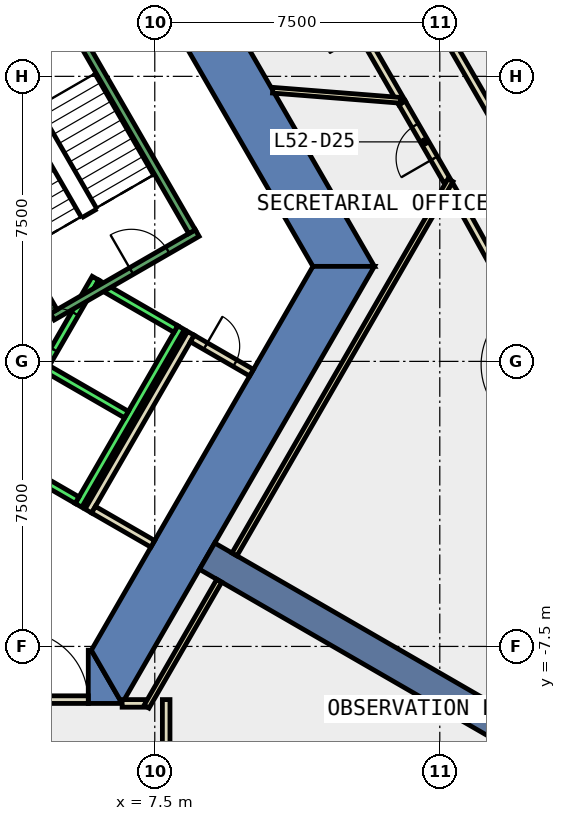
"""IFC4 building model, lengths in metres.
Left out: names, types, materials, properties, quantities, classifications, styles, units other than length and angle.
Written with IfcOpenShell. Run it as: python <this file> out.ifc"""

import sys

from ifc_helpers import new_model, si_unit, direction, frame, frame_2d, origin, place, context, subcontext, project, spatial, polyline, rectangle, outline, extrude, element, fill, save


model = new_model("IFC4")
c1 = context("Model", 3, precision=1e-05, world=origin(), true_north=direction((0.0, 1.0)))
c2 = subcontext(c1, "Body", "Model", "MODEL_VIEW")
j1 = project(units=[si_unit("LENGTHUNIT", "METRE"), si_unit("PLANEANGLEUNIT", "RADIAN")], contexts=[c1])
p1 = place(None, origin())
s1 = spatial("IfcSite", under=j1, at=p1, CompositionType="ELEMENT")
p2 = place(p1, origin())
s2 = spatial("IfcBuilding", under=s1, at=p2, CompositionType="ELEMENT")
p3 = place(p2, frame((0.0, 0.0, 231.8)))
s3 = spatial("IfcBuildingStorey", under=s2, at=p3, CompositionType="ELEMENT", Elevation=231.8)
p4 = place(p3, frame((0.0, 0.0, -0.4)))
e1 = element("IfcWall", 1, at=p4, inside=s3, PredefinedType="SHEAR", context=c2, shape_type="SweptSolid", body=[
    extrude(outline(polyline([(8.084, 11.498), (6.871, 10.798), (11.662, 2.5), (13.279, 2.5), (8.084, 11.498)])), origin(), (0.0, 0.0, 1.0), 4.0),
])
p5 = place(p3, frame((0.0, 0.0, -0.4)))
e2 = element("IfcWall", 2, at=p5, inside=s3, PredefinedType="SHEAR", context=c2, shape_type="SweptSolid", body=[
    extrude(outline(polyline([(5.75, -7.6), (5.75, -9.0), (6.64, -9.0), (5.831, -7.6), (5.75, -7.6)])), origin(), (0.0, 0.0, 1.0), 4.0),
])
p6 = place(p3, frame((0.0, 0.0, -0.4)))
e3 = element("IfcWall", 3, at=p6, inside=s3, PredefinedType="SHEAR", context=c2, shape_type="SweptSolid", body=[
    extrude(outline(polyline([(6.64, -9.0), (13.279, 2.5), (11.662, 2.5), (5.831, -7.6), (6.64, -9.0)])), origin(), (0.0, 0.0, 1.0), 4.0),
])
p7 = place(p3, frame((8.877, -5.125, -0.4), z_axis=(0.0, 0.0, 1.0), x_axis=(0.866017533419, -0.500013631625, 0.0)))
e4 = element("IfcWall", 4, at=p7, inside=s3, PredefinedType="SHEAR", context=c2, shape_type="SweptSolid", body=[
    extrude(rectangle(XDim=9.0, YDim=0.8, at=frame_2d((4.5, 0.0))), origin(), (0.0, 0.0, 1.0), 4.0),
])
p8 = place(p3, frame((15.194, 4.747, 0.0), z_axis=(0.0, 0.0, 1.0), x_axis=(-0.500140598757, 0.865944213836, 0.0)))
e5 = element("IfcWall", 5, at=p8, inside=s3, PredefinedType="PARTITIONING", context=c2, shape_type="SweptSolid", body=[
    extrude(rectangle(XDim=2.375, YDim=0.2, at=frame_2d((1.188, 0.0))), origin(), (0.0, 0.0, 1.0), 3.6),
])
p9 = place(p8, frame((0.688, 0.0, 0.0)))
e6 = element("IfcOpeningElement", 6, at=p9, cuts=e5, PredefinedType="OPENING", context=c2, shape_type="SweptSolid", body=[
    extrude(rectangle(XDim=1.0, YDim=2.1, at=frame_2d((0.5, 1.05))), frame((0.0, 0.11, 0.0), z_axis=(0.0, -1.0, 0.0), x_axis=(1.0, 0.0, 0.0)), (0.0, 0.0, 1.0), 0.22),
])
p10 = place(p3, frame((14.006, 6.804, 0.0), z_axis=(0.0, 0.0, 1.0), x_axis=(-0.500032993936, 0.866006353889, 0.0)))
e7 = element("IfcWall", 7, at=p10, inside=s3, PredefinedType="PARTITIONING", context=c2, shape_type="SweptSolid", body=[
    extrude(rectangle(XDim=5.172, YDim=0.2, at=frame_2d((2.586, 0.0))), origin(), (0.0, 0.0, 1.0), 3.6),
])
p11 = place(p10, frame((2.086, 0.0, 0.0)))
e8 = element("IfcOpeningElement", 8, at=p11, cuts=e7, PredefinedType="OPENING", context=c2, shape_type="SweptSolid", body=[
    extrude(rectangle(XDim=1.0, YDim=2.1, at=frame_2d((0.5, 1.05))), frame((0.0, 0.11, 0.0), z_axis=(0.0, -1.0, 0.0), x_axis=(1.0, 0.0, 0.0)), (0.0, 0.0, 1.0), 0.22),
])
p12 = place(p3, frame((19.419, -2.856, 0.0), z_axis=(0.0, 0.0, 1.0), x_axis=(-0.484683114876, 0.874689818252, 0.0)))
e9 = element("IfcWall", 9, at=p12, inside=s3, PredefinedType="PARTITIONING", context=c2, shape_type="SweptSolid", body=[
    extrude(rectangle(XDim=8.123, YDim=0.2, at=frame_2d((4.062, 0.0))), origin(), (0.0, 0.0, 1.0), 3.6),
])
p13 = place(p12, frame((3.161, 0.0, 0.0)))
e10 = element("IfcOpeningElement", 10, at=p13, cuts=e9, PredefinedType="OPENING", context=c2, shape_type="SweptSolid", body=[
    extrude(rectangle(XDim=1.8, YDim=2.1, at=frame_2d((0.9, 1.05))), frame((0.0, 0.11, 0.0), z_axis=(0.0, -1.0, 0.0), x_axis=(1.0, 0.0, 0.0)), (0.0, 0.0, 1.0), 0.22),
])
p14 = place(p3, frame((15.482, 4.249, 0.0), z_axis=(0.0, 0.0, 1.0), x_axis=(-0.500832493767, 0.865544229481, 0.0)))
e11 = element("IfcWall", 11, at=p14, inside=s3, PredefinedType="PARTITIONING", context=c2, shape_type="SweptSolid", body=[
    extrude(rectangle(XDim=0.425, YDim=0.2, at=frame_2d((0.212, 0.0))), origin(), (0.0, 0.0, 1.0), 3.6),
])
p15 = place(p3, frame((15.135, 8.65, 0.0), z_axis=(0.0, 0.0, 1.0), x_axis=(0.500102734445, -0.865966081899, 0.0)))
e12 = element("IfcWall", 12, at=p15, inside=s3, PredefinedType="PARTITIONING", context=c2, shape_type="SweptSolid", body=[
    extrude(rectangle(XDim=4.001, YDim=0.2, at=frame_2d((2.0, 0.0))), origin(), (0.0, 0.0, 1.0), 3.6),
])
p16 = place(p3, frame((5.751, -3.938, 0.0), z_axis=(0.0, 0.0, 1.0), x_axis=(0.500034260056, 0.866005622828, 0.0)))
e13 = element("IfcWall", 13, at=p16, inside=s3, PredefinedType="PARTITIONING", context=c2, shape_type="SweptSolid", body=[
    extrude(rectangle(XDim=5.399, YDim=0.2, at=frame_2d((2.7, 0.0))), origin(), (0.0, 0.0, 1.0), 3.6),
])
p17 = place(p3, frame((8.488, 0.602, 0.0), z_axis=(0.0, 0.0, 1.0), x_axis=(0.86585331735, -0.500297944063, 0.0)))
e14 = element("IfcWall", 14, at=p17, inside=s3, PredefinedType="PARTITIONING", context=c2, shape_type="SweptSolid", body=[
    extrude(rectangle(XDim=1.799, YDim=0.2, at=frame_2d((0.9, 0.0))), origin(), (0.0, 0.0, 1.0), 3.6),
])
p18 = place(p17, frame((0.4, 0.0, 0.0)))
e15 = element("IfcOpeningElement", 15, at=p18, cuts=e14, PredefinedType="OPENING", context=c2, shape_type="SweptSolid", body=[
    extrude(rectangle(XDim=0.9, YDim=2.1, at=frame_2d((0.45, 1.05))), frame((0.0, 0.11, 0.0), z_axis=(0.0, -1.0, 0.0), x_axis=(1.0, 0.0, 0.0)), (0.0, 0.0, 1.0), 0.22),
])
p19 = place(p3, frame((7.447, -4.801, 0.0), z_axis=(0.0, 0.0, 1.0), x_axis=(-0.866316547501, 0.499495384889, 0.0)))
e16 = element("IfcWall", 16, at=p19, inside=s3, PredefinedType="PARTITIONING", context=c2, shape_type="SweptSolid", body=[
    extrude(rectangle(XDim=1.8, YDim=0.2, at=frame_2d((0.9, 0.0))), origin(), (0.0, 0.0, 1.0), 3.6),
])
p20 = place(p3, frame((10.604, 7.135, 0.0), z_axis=(0.0, 0.0, 1.0), x_axis=(0.996887536909, -0.07883678555, 0.0)))
e17 = element("IfcWall", 17, at=p20, inside=s3, PredefinedType="PARTITIONING", context=c2, shape_type="SweptSolid", body=[
    extrude(rectangle(XDim=3.375, YDim=0.15, at=frame_2d((1.688, 0.0))), origin(), (0.0, 0.0, 1.0), 3.6),
])
p21 = place(p3, frame((6.641, -8.999, 0.0), z_axis=(0.0, 0.0, 1.0), x_axis=(1.0, 0.0, 0.0)))
e18 = element("IfcWall", 18, at=p21, inside=s3, PredefinedType="PARTITIONING", context=c2, shape_type="SweptSolid", body=[
    extrude(rectangle(XDim=0.617, YDim=0.2, at=frame_2d((0.309, 0.0))), origin(), (0.0, 0.0, 1.0), 3.6),
])
p22 = place(p3, frame((7.283, -9.086, 0.0), z_axis=(0.0, 0.0, 1.0), x_axis=(0.500035303972, 0.866005020067, 0.0)))
e19 = element("IfcWall", 19, at=p22, inside=s3, PredefinedType="PARTITIONING", context=c2, shape_type="SweptSolid", body=[
    extrude(rectangle(XDim=3.828, YDim=0.15, at=frame_2d((1.914, 0.0))), origin(), (0.0, 0.0, 1.0), 3.6),
])
p23 = place(p3, frame((7.8, -8.899, 0.0), z_axis=(0.0, 0.0, 1.0), x_axis=(0.0, -1.0, 0.0)))
e20 = element("IfcWall", 20, at=p23, inside=s3, PredefinedType="PARTITIONING", context=c2, shape_type="SweptSolid", body=[
    extrude(rectangle(XDim=7.477, YDim=0.2, at=frame_2d((3.739, 0.0))), origin(), (0.0, 0.0, 1.0), 3.6),
])
p24 = place(p3, frame((3.75, -8.9, 0.0), z_axis=(0.0, 0.0, 1.0), x_axis=(1.0, 0.0, 0.0)))
e21 = element("IfcWall", 21, at=p24, inside=s3, PredefinedType="PARTITIONING", context=c2, shape_type="SweptSolid", body=[
    extrude(rectangle(XDim=2.0, YDim=0.2, at=frame_2d((1.0, 0.0))), origin(), (0.0, 0.0, 1.0), 2.4),
])
p25 = place(p24, frame((0.19, 0.0, 0.0)))
e22 = element("IfcOpeningElement", 22, at=p25, cuts=e21, PredefinedType="OPENING", context=c2, shape_type="SweptSolid", body=[
    extrude(rectangle(XDim=1.8, YDim=2.1, at=frame_2d((0.9, 1.05))), frame((0.0, 0.11, 0.0), z_axis=(0.0, -1.0, 0.0), x_axis=(1.0, 0.0, 0.0)), (0.0, 0.0, 1.0), 0.22),
])
p26 = place(p3, frame((9.597, -5.079, 0.0), z_axis=(0.0, 0.0, 1.0), x_axis=(0.499949193323, 0.866054735046, 0.0)))
e23 = element("IfcWall", 23, at=p26, inside=s3, PredefinedType="PARTITIONING", context=c2, shape_type="SweptSolid", body=[
    extrude(rectangle(XDim=11.371, YDim=0.15, at=frame_2d((5.686, 0.0))), origin(), (0.0, 0.0, 1.0), 3.6),
])
p27 = place(p3, frame((3.24, -2.488, 0.0), z_axis=(0.0, 0.0, 1.0), x_axis=(0.500034260056, 0.866005622828, 0.0)))
e24 = element("IfcWall", 24, at=p27, inside=s3, PredefinedType="STANDARD", context=c2, shape_type="SweptSolid", body=[
    extrude(rectangle(XDim=5.399, YDim=0.2, at=frame_2d((2.7, 0.0))), origin(), (0.0, 0.0, 1.0), 3.6),
])
p28 = place(p27, frame((3.225, 0.0, 0.0)))
e25 = element("IfcOpeningElement", 25, at=p28, cuts=e24, PredefinedType="OPENING", context=c2, shape_type="SweptSolid", body=[
    extrude(rectangle(XDim=1.1, YDim=2.1, at=frame_2d((0.55, 1.05))), frame((0.0, 0.11, 0.0), z_axis=(0.0, -1.0, 0.0), x_axis=(1.0, 0.0, 0.0)), (0.0, 0.0, 1.0), 0.22),
])
p29 = place(p27, frame((1.225, 0.0, 0.0)))
e26 = element("IfcOpeningElement", 26, at=p29, cuts=e24, PredefinedType="OPENING", context=c2, shape_type="SweptSolid", body=[
    extrude(rectangle(XDim=1.1, YDim=2.1, at=frame_2d((0.55, 1.05))), frame((0.0, 0.11, 0.0), z_axis=(0.0, -1.0, 0.0), x_axis=(1.0, 0.0, 0.0)), (0.0, 0.0, 1.0), 0.22),
])
p30 = place(p3, frame((5.492, -3.788, 0.0), z_axis=(0.0, 0.0, 1.0), x_axis=(0.500034260056, 0.866005622828, 0.0)))
e27 = element("IfcWall", 27, at=p30, inside=s3, PredefinedType="STANDARD", context=c2, shape_type="SweptSolid", body=[
    extrude(rectangle(XDim=5.399, YDim=0.2, at=frame_2d((2.7, 0.0))), origin(), (0.0, 0.0, 1.0), 3.6),
])
p31 = place(p3, frame((3.377, -2.452, 0.0), z_axis=(0.0, 0.0, 1.0), x_axis=(0.865955154139, -0.50012165622, 0.0)))
e28 = element("IfcWall", 28, at=p31, inside=s3, PredefinedType="STANDARD", context=c2, shape_type="SweptSolid", body=[
    extrude(rectangle(XDim=2.4, YDim=0.2, at=frame_2d((1.2, 0.0))), origin(), (0.0, 0.0, 1.0), 3.6),
])
for number, where, z_axis, x_axis in (
    (29, (4.677, -0.2, 0.0), (0.0, 0.0, 1.0), (0.866, -0.5, 0.0)),
    (30, (5.977, 2.052, 0.0), (0.0, 0.0, 1.0), (0.866, -0.5, 0.0)),
):
    element("IfcWall", number, at=place(p3, frame(where, z_axis=z_axis, x_axis=x_axis)), inside=s3, PredefinedType="STANDARD", context=c2, shape_type="SweptSolid", body=[
        extrude(rectangle(XDim=2.399, YDim=0.2, at=frame_2d((1.2, 0.0))), origin(), (0.0, 0.0, 1.0), 3.6),
    ])
p32 = place(p3, frame((4.806, 1.176, 0.0), z_axis=(0.0, 0.0, 1.0), x_axis=(0.866059941101, 0.499940174841, 0.0)))
e31 = element("IfcWall", 31, at=p32, inside=s3, PredefinedType="STANDARD", context=c2, shape_type="SweptSolid", body=[
    extrude(rectangle(XDim=4.4, YDim=0.2, at=frame_2d((2.2, 0.0))), origin(), (0.0, 0.0, 1.0), 3.6),
])
p33 = place(p32, frame((2.4, 0.0, 0.0)))
e32 = element("IfcOpeningElement", 32, at=p33, cuts=e31, PredefinedType="OPENING", context=c2, shape_type="SweptSolid", body=[
    extrude(rectangle(XDim=1.1, YDim=2.2, at=frame_2d((0.55, 1.1))), frame((0.0, 0.11, 0.0), z_axis=(0.0, -1.0, 0.0), x_axis=(1.0, 0.0, 0.0)), (0.0, 0.0, 1.0), 0.22),
])
p34 = place(p3, frame((2.7, 8.158, 0.0), z_axis=(0.0, 0.0, 1.0), x_axis=(0.86611865017, 0.499838457731, 0.0)))
e33 = element("IfcWall", 33, at=p34, inside=s3, PredefinedType="STANDARD", context=c2, shape_type="SweptSolid", body=[
    extrude(rectangle(XDim=2.733, YDim=0.2, at=frame_2d((1.366, 0.0))), origin(), (0.0, 0.0, 1.0), 3.6),
])
p35 = place(p3, frame((4.843, 1.312, 0.0), z_axis=(0.0, 0.0, 1.0), x_axis=(-0.499963383562, 0.866046543262, 0.0)))
e34 = element("IfcWall", 34, at=p35, inside=s3, PredefinedType="STANDARD", context=c2, shape_type="SweptSolid", body=[
    extrude(rectangle(XDim=6.9, YDim=0.2, at=frame_2d((3.45, 0.0))), origin(), (0.0, 0.0, 1.0), 3.6),
])
p36 = place(p35, frame((0.45, 0.0, 0.0)))
e35 = element("IfcOpeningElement", 35, at=p36, cuts=e34, PredefinedType="OPENING", context=c2, shape_type="SweptSolid", body=[
    extrude(rectangle(XDim=1.1, YDim=2.2, at=frame_2d((0.55, 1.1))), frame((0.0, 0.11, 0.0), z_axis=(0.0, -1.0, 0.0), x_axis=(1.0, 0.0, 0.0)), (0.0, 0.0, 1.0), 0.22),
])
p37 = place(p3, frame((8.48, 3.412, 0.0), z_axis=(0.0, 0.0, 1.0), x_axis=(-0.499978703459, 0.866037698999, 0.0)))
e36 = element("IfcWall", 36, at=p37, inside=s3, PredefinedType="STANDARD", context=c2, shape_type="SweptSolid", body=[
    extrude(rectangle(XDim=6.9, YDim=0.2, at=frame_2d((3.45, 0.0))), origin(), (0.0, 0.0, 1.0), 3.6),
])
p38 = place(p9, origin())
e37 = element("IfcDoor", 37, at=p38, inside=s3, OperationType="SINGLE_SWING_LEFT", PredefinedType="DOOR", context=c2, shape_type="SweptSolid", body=[
    extrude(rectangle(XDim=1.0, YDim=2.1, at=frame_2d((0.5, 1.05))), frame((0.0, 0.025, 0.0), z_axis=(0.0, -1.0, 0.0), x_axis=(1.0, 0.0, 0.0)), (0.0, 0.0, 1.0), 0.05),
])
fill(e6, e37)
p39 = place(p18, origin())
e38 = element("IfcDoor", 38, at=p39, inside=s3, OperationType="SINGLE_SWING_RIGHT", PredefinedType="DOOR", context=c2, shape_type="SweptSolid", body=[
    extrude(rectangle(XDim=0.9, YDim=2.1, at=frame_2d((0.45, 1.05))), frame((0.0, 0.025, 0.0), z_axis=(0.0, -1.0, 0.0), x_axis=(1.0, 0.0, 0.0)), (0.0, 0.0, 1.0), 0.05),
])
fill(e15, e38)
p40 = place(p25, origin())
e39 = element("IfcDoor", 39, at=p40, inside=s3, OperationType="DOUBLE_DOOR_SINGLE_SWING", PredefinedType="DOOR", context=c2, shape_type="SweptSolid", body=[
    extrude(rectangle(XDim=1.8, YDim=2.1, at=frame_2d((0.9, 1.05))), frame((0.0, 0.025, 0.0), z_axis=(0.0, -1.0, 0.0), x_axis=(1.0, 0.0, 0.0)), (0.0, 0.0, 1.0), 0.05),
])
fill(e22, e39)
p41 = place(p28, origin())
e40 = element("IfcDoor", 40, at=p41, inside=s3, OperationType="SLIDING_TO_LEFT", PredefinedType="DOOR", context=c2, shape_type="SweptSolid", body=[
    extrude(rectangle(XDim=1.1, YDim=2.1, at=frame_2d((0.55, 1.05))), frame((0.0, 0.025, 0.0), z_axis=(0.0, -1.0, 0.0), x_axis=(1.0, 0.0, 0.0)), (0.0, 0.0, 1.0), 0.05),
])
fill(e25, e40)
p42 = place(p33, origin())
e41 = element("IfcDoor", 41, at=p42, inside=s3, OperationType="SINGLE_SWING_LEFT", PredefinedType="DOOR", context=c2, shape_type="SweptSolid", body=[
    extrude(rectangle(XDim=1.1, YDim=2.2, at=frame_2d((0.55, 1.1))), frame((0.0, 0.025, 0.0), z_axis=(0.0, -1.0, 0.0), x_axis=(1.0, 0.0, 0.0)), (0.0, 0.0, 1.0), 0.05),
])
fill(e32, e41)
save(model, sys.argv[1])
